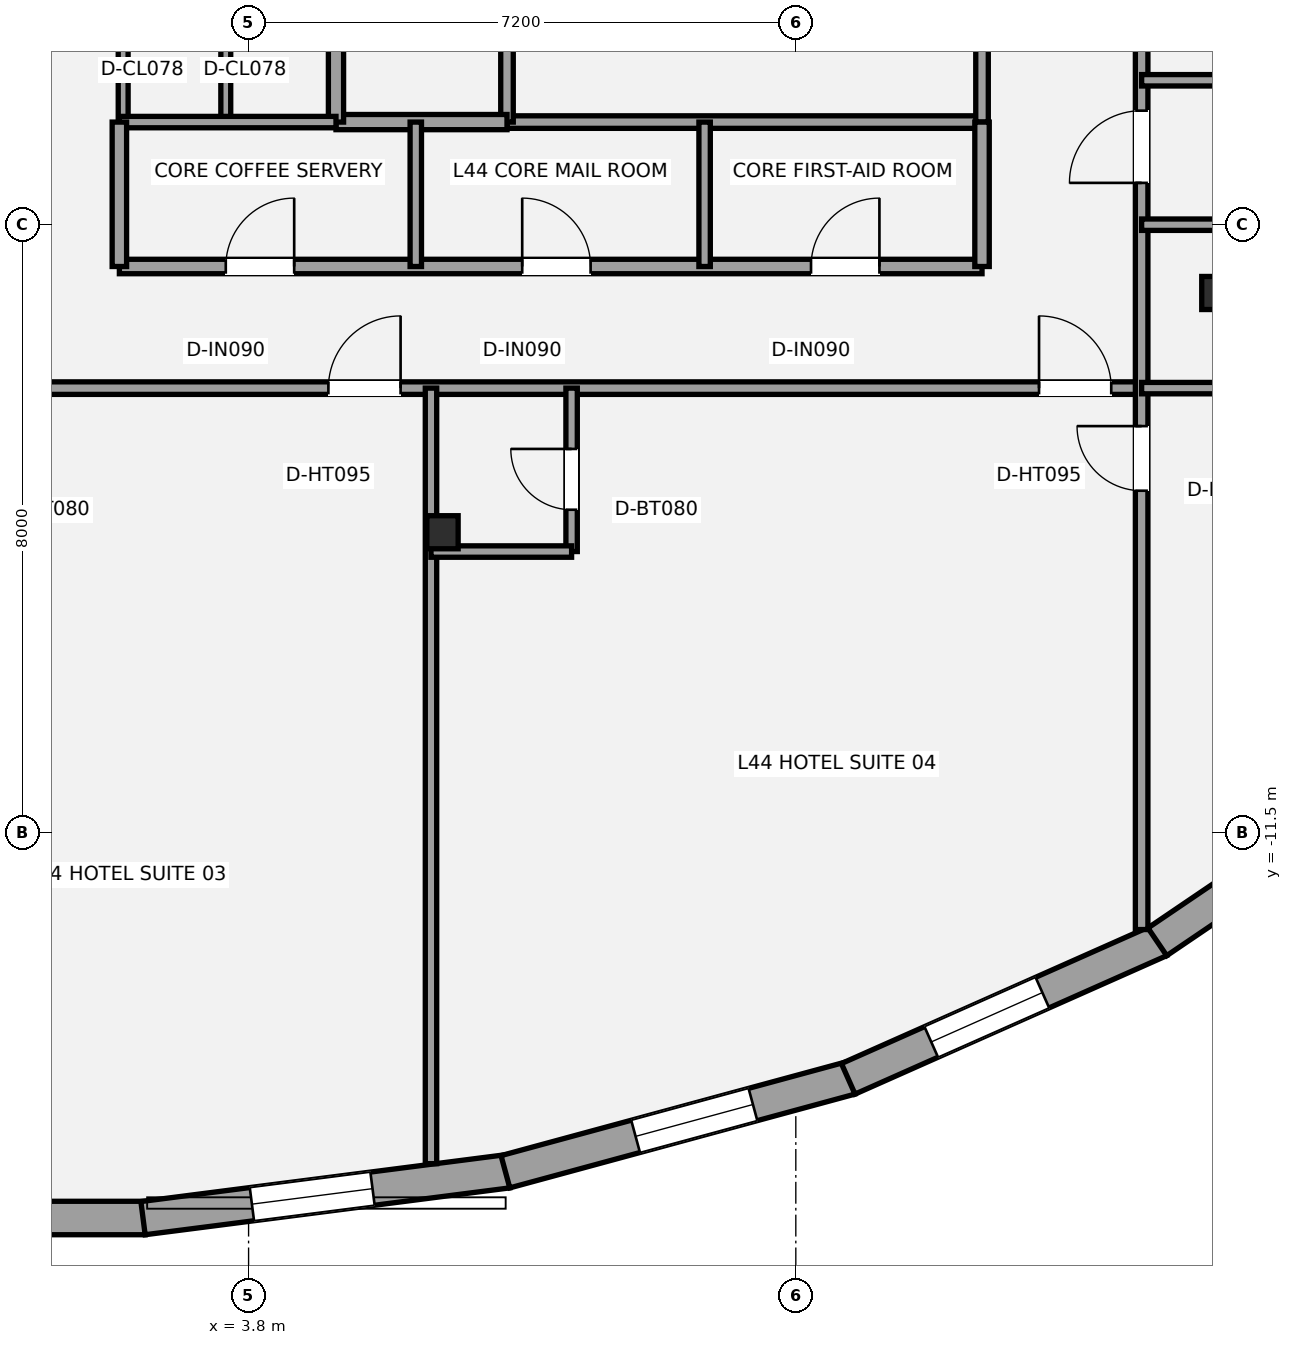
"""IFC4 building model, lengths in metres.
Left out: names, types, materials, properties, quantities, classifications, styles, units other than length and angle.
Written with IfcOpenShell. Run it as: python <this file> out.ifc"""

import sys

from ifc_helpers import new_model, si_unit, direction, frame, frame_2d, origin, origin_2d, place, context, subcontext, project, spatial, rectangle, i_section, extrude, element, fill, save


model = new_model("IFC4")
c1 = context("Model", 3, precision=1e-05, world=origin(), true_north=direction((0.0, 1.0)))
c2 = subcontext(c1, "Body", "Model", "MODEL_VIEW")
j1 = project(units=[si_unit("LENGTHUNIT", "METRE"), si_unit("PLANEANGLEUNIT", "RADIAN")], contexts=[c1])
p1 = place(None, origin())
s1 = spatial("IfcSite", under=j1, at=p1, CompositionType="ELEMENT")
p2 = place(p1, origin())
s2 = spatial("IfcBuilding", under=s1, at=p2, CompositionType="ELEMENT")
p3 = place(p2, frame((0.0, 0.0, 163.0)))
s3 = spatial("IfcBuildingStorey", under=s2, at=p3, CompositionType="ELEMENT", Elevation=163.0)
for number, where, z_axis, x_axis in (
    (1, (6.351, -7.546, 0.0), (0.0, 0.0, 1.0), (1.0, 0.0, 0.0)),
    (2, (16.547, -4.398, 0.0), (0.0, 0.0, 1.0), (1.0, 0.0, 0.0)),
):
    element("IfcColumn", number, at=place(p3, frame(where, z_axis=z_axis, x_axis=x_axis)), inside=s3, PredefinedType="COLUMN", context=c2, shape_type="SweptSolid", body=[
        extrude(i_section(OverallWidth=0.412, OverallDepth=0.435, WebThickness=0.036, FlangeThickness=0.057, at=origin_2d()), origin(), (0.0, 0.0, 1.0), 3.2),
    ])
p4 = place(p3, frame((2.439, -16.568, 0.0), z_axis=(0.0, 0.0, 1.0), x_axis=(-1.0, 0.0, 0.0)))
e3 = element("IfcWall", 3, at=p4, inside=s3, PredefinedType="STANDARD", context=c2, shape_type="SweptSolid", body=[
    extrude(rectangle(XDim=4.878, YDim=0.44, at=frame_2d((2.439, 0.0))), origin(), (0.0, 0.0, 1.0), 2.315),
])
p5 = place(p4, frame((1.441, 0.0, 0.58)))
e4 = element("IfcOpeningElement", 4, at=p5, cuts=e3, PredefinedType="OPENING", context=c2, shape_type="SweptSolid", body=[
    extrude(rectangle(XDim=1.6, YDim=1.55, at=frame_2d((0.8, 0.775))), frame((0.0, 0.23, 0.0), z_axis=(0.0, -1.0, 0.0), x_axis=(1.0, 0.0, 0.0)), (0.0, 0.0, 1.0), 0.46),
])
p6 = place(p3, frame((7.209, -15.954, 0.0), z_axis=(0.0, 0.0, 1.0), x_axis=(-0.991852910824, -0.127388395426, 0.0)))
e5 = element("IfcWall", 5, at=p6, inside=s3, PredefinedType="STANDARD", context=c2, shape_type="SweptSolid", body=[
    extrude(rectangle(XDim=4.837, YDim=0.44, at=frame_2d((2.418, 0.0))), origin(), (0.0, 0.0, 1.0), 2.315),
])
p7 = place(p6, frame((1.793, 0.0, 0.58)))
e6 = element("IfcOpeningElement", 6, at=p7, cuts=e5, PredefinedType="OPENING", context=c2, shape_type="SweptSolid", body=[
    extrude(rectangle(XDim=1.6, YDim=1.55, at=frame_2d((0.8, 0.775))), frame((0.0, 0.23, 0.0), z_axis=(0.0, -1.0, 0.0), x_axis=(1.0, 0.0, 0.0)), (0.0, 0.0, 1.0), 0.46),
])
p8 = place(p3, frame((11.721, -14.726, 0.0), z_axis=(0.0, 0.0, 1.0), x_axis=(-0.965037424263, -0.262112132058, 0.0)))
e7 = element("IfcWall", 7, at=p8, inside=s3, PredefinedType="STANDARD", context=c2, shape_type="SweptSolid", body=[
    extrude(rectangle(XDim=4.707, YDim=0.44, at=frame_2d((2.353, 0.0))), origin(), (0.0, 0.0, 1.0), 2.315),
])
p9 = place(p8, frame((1.332, 0.0, 0.58)))
e8 = element("IfcOpeningElement", 8, at=p9, cuts=e7, PredefinedType="OPENING", context=c2, shape_type="SweptSolid", body=[
    extrude(rectangle(XDim=1.6, YDim=1.55, at=frame_2d((0.8, 0.775))), frame((0.0, 0.23, 0.0), z_axis=(0.0, -1.0, 0.0), x_axis=(1.0, 0.0, 0.0)), (0.0, 0.0, 1.0), 0.46),
])
p10 = place(p3, frame((15.791, -12.916, 0.0), z_axis=(0.0, 0.0, 1.0), x_axis=(-0.913907994914, -0.405921392431, 0.0)))
e9 = element("IfcWall", 9, at=p10, inside=s3, PredefinedType="STANDARD", context=c2, shape_type="SweptSolid", body=[
    extrude(rectangle(XDim=4.487, YDim=0.44, at=frame_2d((2.244, 0.0))), origin(), (0.0, 0.0, 1.0), 2.315),
])
p11 = place(p10, frame((1.692, 0.0, 0.58)))
e10 = element("IfcOpeningElement", 10, at=p11, cuts=e9, PredefinedType="OPENING", context=c2, shape_type="SweptSolid", body=[
    extrude(rectangle(XDim=1.6, YDim=1.55, at=frame_2d((0.8, 0.775))), frame((0.0, 0.23, 0.0), z_axis=(0.0, -1.0, 0.0), x_axis=(1.0, 0.0, 0.0)), (0.0, 0.0, 1.0), 0.46),
])
p12 = place(p3, frame((19.227, -10.583, 0.0), z_axis=(0.0, 0.0, 1.0), x_axis=(-0.827760762475, -0.561081206338, 0.0)))
e11 = element("IfcWall", 11, at=p12, inside=s3, PredefinedType="STANDARD", context=c2, shape_type="SweptSolid", body=[
    extrude(rectangle(XDim=4.192, YDim=0.44, at=frame_2d((2.096, 0.0))), origin(), (0.0, 0.0, 1.0), 2.315),
])
p13 = place(p12, frame((0.947, 0.0, 0.58)))
e12 = element("IfcOpeningElement", 12, at=p13, cuts=e11, PredefinedType="OPENING", context=c2, shape_type="SweptSolid", body=[
    extrude(rectangle(XDim=1.6, YDim=1.55, at=frame_2d((0.8, 0.775))), frame((0.0, 0.23, 0.0), z_axis=(0.0, -1.0, 0.0), x_axis=(1.0, 0.0, 0.0)), (0.0, 0.0, 1.0), 0.46),
])
p14 = place(p3, frame((7.2, -2.15, 0.0), z_axis=(0.0, 0.0, 1.0), x_axis=(1.0, 0.0, 0.0)))
e13 = element("IfcWall", 13, at=p14, inside=s3, PredefinedType="PARTITIONING", context=c2, shape_type="SweptSolid", body=[
    extrude(rectangle(XDim=6.25, YDim=0.165, at=frame_2d((3.125, 0.0))), origin(), (0.0, 0.0, 1.0), 3.02),
])
p15 = place(p3, frame((7.2, -2.15, 0.0), z_axis=(0.0, 0.0, 1.0), x_axis=(0.0, 1.0, 0.0)))
e14 = element("IfcWall", 14, at=p15, inside=s3, PredefinedType="PARTITIONING", context=c2, shape_type="SweptSolid", body=[
    extrude(rectangle(XDim=3.4, YDim=0.165, at=frame_2d((1.7, 0.0))), origin(), (0.0, 0.0, 1.0), 2.473),
])
p16 = place(p3, frame((13.45, -2.15, 0.0), z_axis=(0.0, 0.0, 1.0), x_axis=(0.0, 1.0, 0.0)))
e15 = element("IfcWall", 15, at=p16, inside=s3, PredefinedType="PARTITIONING", context=c2, shape_type="SweptSolid", body=[
    extrude(rectangle(XDim=3.4, YDim=0.165, at=frame_2d((1.7, 0.0))), origin(), (0.0, 0.0, 1.0), 3.02),
])
p17 = place(p16, frame((1.15, 0.0, 0.0)))
e16 = element("IfcOpeningElement", 16, at=p17, cuts=e15, PredefinedType="OPENING", context=c2, shape_type="SweptSolid", body=[
    extrude(rectangle(XDim=1.05, YDim=2.15, at=frame_2d((0.525, 1.075))), frame((0.0, 0.093, 0.0), z_axis=(0.0, -1.0, 0.0), x_axis=(1.0, 0.0, 0.0)), (0.0, 0.0, 1.0), 0.185),
])
p18 = place(p3, frame((4.95, -2.15, 0.0), z_axis=(0.0, 0.0, 1.0), x_axis=(1.0, 0.0, 0.0)))
e17 = element("IfcWall", 17, at=p18, inside=s3, PredefinedType="SOLIDWALL", context=c2, shape_type="SweptSolid", body=[
    extrude(rectangle(XDim=2.25, YDim=0.2, at=frame_2d((1.125, 0.0))), origin(), (0.0, 0.0, 1.0), 3.02),
])
p19 = place(p3, frame((4.95, -2.15, 0.0), z_axis=(0.0, 0.0, 1.0), x_axis=(0.0, 1.0, 0.0)))
e18 = element("IfcWall", 18, at=p19, inside=s3, PredefinedType="SOLIDWALL", context=c2, shape_type="SweptSolid", body=[
    extrude(rectangle(XDim=3.4, YDim=0.2, at=frame_2d((1.7, 0.0))), origin(), (0.0, 0.0, 1.0), 2.473),
])
p20 = place(p19, frame((0.95, 0.0, 0.0)))
e19 = element("IfcOpeningElement", 19, at=p20, cuts=e18, PredefinedType="OPENING", context=c2, shape_type="SweptSolid", body=[
    extrude(rectangle(XDim=0.75, YDim=2.1, at=frame_2d((0.375, 1.05))), frame((0.0, 0.11, 0.0), z_axis=(0.0, -1.0, 0.0), x_axis=(1.0, 0.0, 0.0)), (0.0, 0.0, 1.0), 0.22),
])
p21 = place(p3, frame((2.15, -2.15, 0.0), z_axis=(0.0, 0.0, 1.0), x_axis=(0.0, 1.0, 0.0)))
e20 = element("IfcWall", 20, at=p21, inside=s3, PredefinedType="PARTITIONING", context=c2, shape_type="SweptSolid", body=[
    extrude(rectangle(XDim=1.8, YDim=0.13, at=frame_2d((0.9, 0.0))), origin(), (0.0, 0.0, 1.0), 3.02),
])
p22 = place(p3, frame((3.5, -2.15, 0.0), z_axis=(0.0, 0.0, 1.0), x_axis=(0.0, 1.0, 0.0)))
e21 = element("IfcWall", 21, at=p22, inside=s3, PredefinedType="PARTITIONING", context=c2, shape_type="SweptSolid", body=[
    extrude(rectangle(XDim=1.8, YDim=0.13, at=frame_2d((0.9, 0.0))), origin(), (0.0, 0.0, 1.0), 2.473),
])
p23 = place(p3, frame((2.1, -4.05, 0.0), z_axis=(0.0, 0.0, 1.0), x_axis=(1.0, 0.0, 0.0)))
e22 = element("IfcWall", 22, at=p23, inside=s3, PredefinedType="PLUMBINGWALL", context=c2, shape_type="SweptSolid", body=[
    extrude(rectangle(XDim=11.35, YDim=0.19, at=frame_2d((5.675, 0.0))), origin(), (0.0, 0.0, 1.0), 2.473),
])
p24 = place(p23, frame((1.4, 0.0, 0.0)))
e23 = element("IfcOpeningElement", 23, at=p24, cuts=e22, PredefinedType="OPENING", context=c2, shape_type="SweptSolid", body=[
    extrude(rectangle(XDim=0.9, YDim=2.1, at=frame_2d((0.45, 1.05))), frame((0.0, 0.105, 0.0), z_axis=(0.0, -1.0, 0.0), x_axis=(1.0, 0.0, 0.0)), (0.0, 0.0, 1.0), 0.21),
])
p25 = place(p23, frame((5.3, 0.0, 0.0)))
e24 = element("IfcOpeningElement", 24, at=p25, cuts=e22, PredefinedType="OPENING", context=c2, shape_type="SweptSolid", body=[
    extrude(rectangle(XDim=0.9, YDim=2.1, at=frame_2d((0.45, 1.05))), frame((0.0, 0.105, 0.0), z_axis=(0.0, -1.0, 0.0), x_axis=(1.0, 0.0, 0.0)), (0.0, 0.0, 1.0), 0.21),
])
p26 = place(p23, frame((9.1, 0.0, 0.0)))
e25 = element("IfcOpeningElement", 25, at=p26, cuts=e22, PredefinedType="OPENING", context=c2, shape_type="SweptSolid", body=[
    extrude(rectangle(XDim=0.9, YDim=2.1, at=frame_2d((0.45, 1.05))), frame((0.0, 0.105, 0.0), z_axis=(0.0, -1.0, 0.0), x_axis=(1.0, 0.0, 0.0)), (0.0, 0.0, 1.0), 0.21),
])
p27 = place(p3, frame((2.1, -2.15, 0.0), z_axis=(0.0, 0.0, 1.0), x_axis=(1.0, 0.0, 0.0)))
e26 = element("IfcWall", 26, at=p27, inside=s3, PredefinedType="PLUMBINGWALL", context=c2, shape_type="SweptSolid", body=[
    extrude(rectangle(XDim=2.85, YDim=0.15, at=frame_2d((1.425, 0.0))), origin(), (0.0, 0.0, 1.0), 3.02),
])
for number, where, z_axis, x_axis in (
    (27, (2.1, -4.05, 0.0), (0.0, 0.0, 1.0), (0.0, 1.0, 0.0)),
    (28, (13.45, -4.05, 0.0), (0.0, 0.0, 1.0), (0.0, 1.0, 0.0)),
):
    element("IfcWall", number, at=place(p3, frame(where, z_axis=z_axis, x_axis=x_axis)), inside=s3, PredefinedType="PLUMBINGWALL", context=c2, shape_type="SweptSolid", body=[
        extrude(rectangle(XDim=1.9, YDim=0.19, at=frame_2d((0.95, 0.0))), origin(), (0.0, 0.0, 1.0), 2.473),
    ])
p28 = place(p3, frame((6.0, -4.05, 0.0), z_axis=(0.0, 0.0, 1.0), x_axis=(0.0, 1.0, 0.0)))
e29 = element("IfcWall", 29, at=p28, inside=s3, PredefinedType="PLUMBINGWALL", context=c2, shape_type="SweptSolid", body=[
    extrude(rectangle(XDim=1.9, YDim=0.15, at=frame_2d((0.95, 0.0))), origin(), (0.0, 0.0, 1.0), 2.473),
])
p29 = place(p3, frame((9.8, -4.05, 0.0), z_axis=(0.0, 0.0, 1.0), x_axis=(0.0, 1.0, 0.0)))
e30 = element("IfcWall", 30, at=p29, inside=s3, PredefinedType="PLUMBINGWALL", context=c2, shape_type="SweptSolid", body=[
    extrude(rectangle(XDim=1.9, YDim=0.15, at=frame_2d((0.95, 0.0))), origin(), (0.0, 0.0, 1.0), 3.02),
])
p30 = place(p3, frame((-15.95, -5.65, 0.0), z_axis=(0.0, 0.0, 1.0), x_axis=(1.0, 0.0, 0.0)))
e31 = element("IfcWall", 31, at=p30, inside=s3, PredefinedType="PARTITIONING", context=c2, shape_type="SweptSolid", body=[
    extrude(rectangle(XDim=31.5, YDim=0.165, at=frame_2d((15.75, 0.0))), origin(), (0.0, 0.0, 1.0), 2.398),
])
p31 = place(p30, frame((4.8, 0.0, 0.0)))
e32 = element("IfcOpeningElement", 32, at=p31, cuts=e31, PredefinedType="OPENING", context=c2, shape_type="SweptSolid", body=[
    extrude(rectangle(XDim=0.95, YDim=2.15, at=frame_2d((0.475, 1.075))), frame((0.0, 0.093, 0.0), z_axis=(0.0, -1.0, 0.0), x_axis=(1.0, 0.0, 0.0)), (0.0, 0.0, 1.0), 0.185),
])
p32 = place(p30, frame((12.8, 0.0, 0.0)))
e33 = element("IfcOpeningElement", 33, at=p32, cuts=e31, PredefinedType="OPENING", context=c2, shape_type="SweptSolid", body=[
    extrude(rectangle(XDim=0.95, YDim=2.15, at=frame_2d((0.475, 1.075))), frame((0.0, 0.093, 0.0), z_axis=(0.0, -1.0, 0.0), x_axis=(1.0, 0.0, 0.0)), (0.0, 0.0, 1.0), 0.185),
])
p33 = place(p30, frame((20.8, 0.0, 0.0)))
e34 = element("IfcOpeningElement", 34, at=p33, cuts=e31, PredefinedType="OPENING", context=c2, shape_type="SweptSolid", body=[
    extrude(rectangle(XDim=0.95, YDim=2.15, at=frame_2d((0.475, 1.075))), frame((0.0, 0.093, 0.0), z_axis=(0.0, -1.0, 0.0), x_axis=(1.0, 0.0, 0.0)), (0.0, 0.0, 1.0), 0.185),
])
p34 = place(p30, frame((30.15, 0.0, 0.0)))
e35 = element("IfcOpeningElement", 35, at=p34, cuts=e31, PredefinedType="OPENING", context=c2, shape_type="SweptSolid", body=[
    extrude(rectangle(XDim=0.95, YDim=2.15, at=frame_2d((0.475, 1.075))), frame((0.0, 0.093, 0.0), z_axis=(0.0, -1.0, 0.0), x_axis=(1.0, 0.0, 0.0)), (0.0, 0.0, 1.0), 0.185),
])
p35 = place(p3, frame((15.55, -12.773, 0.0), z_axis=(0.0, 0.0, 1.0), x_axis=(0.0, 1.0, 0.0)))
e36 = element("IfcWall", 36, at=p35, inside=s3, PredefinedType="PARTITIONING", context=c2, shape_type="SweptSolid", body=[
    extrude(rectangle(XDim=20.323, YDim=0.165, at=frame_2d((10.162, 0.0))), origin(), (0.0, 0.0, 1.0), 2.473),
])
p36 = place(p35, frame((5.773, 0.0, 0.0)))
e37 = element("IfcOpeningElement", 37, at=p36, cuts=e36, PredefinedType="OPENING", context=c2, shape_type="SweptSolid", body=[
    extrude(rectangle(XDim=0.85, YDim=2.1, at=frame_2d((0.425, 1.05))), frame((0.0, 0.093, 0.0), z_axis=(0.0, -1.0, 0.0), x_axis=(1.0, 0.0, 0.0)), (0.0, 0.0, 1.0), 0.185),
])
p37 = place(p35, frame((9.823, 0.0, 0.0)))
e38 = element("IfcOpeningElement", 38, at=p37, cuts=e36, PredefinedType="OPENING", context=c2, shape_type="SweptSolid", body=[
    extrude(rectangle(XDim=0.95, YDim=2.15, at=frame_2d((0.475, 1.075))), frame((0.0, 0.093, 0.0), z_axis=(0.0, -1.0, 0.0), x_axis=(1.0, 0.0, 0.0)), (0.0, 0.0, 1.0), 0.185),
])
p38 = place(p35, frame((14.223, 0.0, 0.0)))
e39 = element("IfcOpeningElement", 39, at=p38, cuts=e36, PredefinedType="OPENING", context=c2, shape_type="SweptSolid", body=[
    extrude(rectangle(XDim=0.95, YDim=2.15, at=frame_2d((0.475, 1.075))), frame((0.0, 0.093, 0.0), z_axis=(0.0, -1.0, 0.0), x_axis=(1.0, 0.0, 0.0)), (0.0, 0.0, 1.0), 0.185),
])
p39 = place(p35, frame((18.973, 0.0, 0.0)))
e40 = element("IfcOpeningElement", 40, at=p39, cuts=e36, PredefinedType="OPENING", context=c2, shape_type="SweptSolid", body=[
    extrude(rectangle(XDim=0.95, YDim=2.15, at=frame_2d((0.475, 1.075))), frame((0.0, 0.093, 0.0), z_axis=(0.0, -1.0, 0.0), x_axis=(1.0, 0.0, 0.0)), (0.0, 0.0, 1.0), 0.185),
])
p40 = place(p3, frame((15.55, -5.65, 0.0), z_axis=(0.0, 0.0, 1.0), x_axis=(1.0, 0.0, 0.0)))
e41 = element("IfcWall", 41, at=p40, inside=s3, PredefinedType="PLUMBINGWALL", context=c2, shape_type="SweptSolid", body=[
    extrude(rectangle(XDim=7.346, YDim=0.15, at=frame_2d((3.673, 0.0))), origin(), (0.0, 0.0, 1.0), 2.473),
])
p41 = place(p3, frame((6.2, -15.853, 0.0), z_axis=(0.0, 0.0, 1.0), x_axis=(0.0, 1.0, 0.0)))
e42 = element("IfcWall", 42, at=p41, inside=s3, PredefinedType="PLUMBINGWALL", context=c2, shape_type="SweptSolid", body=[
    extrude(rectangle(XDim=10.203, YDim=0.15, at=frame_2d((5.102, 0.0))), origin(), (0.0, 0.0, 1.0), 2.473),
])
p42 = place(p3, frame((8.05, -7.8, 0.0), z_axis=(0.0, 0.0, 1.0), x_axis=(0.0, 1.0, 0.0)))
e43 = element("IfcWall", 43, at=p42, inside=s3, PredefinedType="PLUMBINGWALL", context=c2, shape_type="SweptSolid", body=[
    extrude(rectangle(XDim=2.15, YDim=0.15, at=frame_2d((1.075, 0.0))), origin(), (0.0, 0.0, 1.0), 2.473),
])
p43 = place(p42, frame((0.55, 0.0, 0.0)))
e44 = element("IfcOpeningElement", 44, at=p43, cuts=e43, PredefinedType="OPENING", context=c2, shape_type="SweptSolid", body=[
    extrude(rectangle(XDim=0.8, YDim=2.1, at=frame_2d((0.4, 1.05))), frame((0.0, 0.085, 0.0), z_axis=(0.0, -1.0, 0.0), x_axis=(1.0, 0.0, 0.0)), (0.0, 0.0, 1.0), 0.17),
])
p44 = place(p3, frame((6.2, -7.8, 0.0), z_axis=(0.0, 0.0, 1.0), x_axis=(1.0, 0.0, 0.0)))
e45 = element("IfcWall", 45, at=p44, inside=s3, PredefinedType="PLUMBINGWALL", context=c2, shape_type="SweptSolid", body=[
    extrude(rectangle(XDim=1.85, YDim=0.15, at=frame_2d((0.925, 0.0))), origin(), (0.0, 0.0, 1.0), 2.473),
])
p45 = place(p3, frame((15.55, -1.6, 0.0), z_axis=(0.0, 0.0, 1.0), x_axis=(1.0, 0.0, 0.0)))
e46 = element("IfcWall", 46, at=p45, inside=s3, PredefinedType="PLUMBINGWALL", context=c2, shape_type="SweptSolid", body=[
    extrude(rectangle(XDim=8.766, YDim=0.15, at=frame_2d((4.383, 0.0))), origin(), (0.0, 0.0, 1.0), 2.398),
])
p46 = place(p3, frame((15.55, -3.5, 0.0), z_axis=(0.0, 0.0, 1.0), x_axis=(1.0, 0.0, 0.0)))
e47 = element("IfcWall", 47, at=p46, inside=s3, PredefinedType="PLUMBINGWALL", context=c2, shape_type="SweptSolid", body=[
    extrude(rectangle(XDim=2.35, YDim=0.15, at=frame_2d((1.175, 0.0))), origin(), (0.0, 0.0, 1.0), 2.398),
])
p47 = place(p7, origin())
e48 = element("IfcWindow", 48, at=p47, inside=s3, PartitioningType="SINGLE_PANEL", PredefinedType="WINDOW", context=c2, shape_type="SweptSolid", body=[
    extrude(rectangle(XDim=1.6, YDim=1.55, at=frame_2d((0.8, 0.775))), frame((0.0, -0.01, 0.0), z_axis=(0.0, -1.0, 0.0), x_axis=(1.0, 0.0, 0.0)), (0.0, 0.0, 1.0), 0.06),
])
fill(e6, e48)
p48 = place(p9, origin())
e49 = element("IfcWindow", 49, at=p48, inside=s3, PartitioningType="SINGLE_PANEL", PredefinedType="WINDOW", context=c2, shape_type="SweptSolid", body=[
    extrude(rectangle(XDim=1.6, YDim=1.55, at=frame_2d((0.8, 0.775))), frame((0.0, -0.01, 0.0), z_axis=(0.0, -1.0, 0.0), x_axis=(1.0, 0.0, 0.0)), (0.0, 0.0, 1.0), 0.06),
])
fill(e8, e49)
p49 = place(p11, origin())
e50 = element("IfcWindow", 50, at=p49, inside=s3, PartitioningType="SINGLE_PANEL", PredefinedType="WINDOW", context=c2, shape_type="SweptSolid", body=[
    extrude(rectangle(XDim=1.6, YDim=1.55, at=frame_2d((0.8, 0.775))), frame((0.0, -0.01, 0.0), z_axis=(0.0, -1.0, 0.0), x_axis=(1.0, 0.0, 0.0)), (0.0, 0.0, 1.0), 0.06),
])
fill(e10, e50)
p50 = place(p24, origin())
e51 = element("IfcDoor", 51, at=p50, inside=s3, OperationType="SINGLE_SWING_RIGHT", PredefinedType="DOOR", context=c2, shape_type="SweptSolid", body=[
    extrude(rectangle(XDim=0.9, YDim=2.1, at=frame_2d((0.45, 1.05))), frame((0.0, 0.025, 0.0), z_axis=(0.0, -1.0, 0.0), x_axis=(1.0, 0.0, 0.0)), (0.0, 0.0, 1.0), 0.05),
])
fill(e23, e51)
p51 = place(p25, origin())
e52 = element("IfcDoor", 52, at=p51, inside=s3, OperationType="SINGLE_SWING_LEFT", PredefinedType="DOOR", context=c2, shape_type="SweptSolid", body=[
    extrude(rectangle(XDim=0.9, YDim=2.1, at=frame_2d((0.45, 1.05))), frame((0.0, 0.025, 0.0), z_axis=(0.0, -1.0, 0.0), x_axis=(1.0, 0.0, 0.0)), (0.0, 0.0, 1.0), 0.05),
])
fill(e24, e52)
p52 = place(p26, origin())
e53 = element("IfcDoor", 53, at=p52, inside=s3, OperationType="SINGLE_SWING_RIGHT", PredefinedType="DOOR", context=c2, shape_type="SweptSolid", body=[
    extrude(rectangle(XDim=0.9, YDim=2.1, at=frame_2d((0.45, 1.05))), frame((0.0, 0.025, 0.0), z_axis=(0.0, -1.0, 0.0), x_axis=(1.0, 0.0, 0.0)), (0.0, 0.0, 1.0), 0.05),
])
fill(e25, e53)
p53 = place(p36, origin())
e54 = element("IfcDoor", 54, at=p53, inside=s3, OperationType="SINGLE_SWING_RIGHT", PredefinedType="DOOR", context=c2, shape_type="SweptSolid", body=[
    extrude(rectangle(XDim=0.85, YDim=2.1, at=frame_2d((0.425, 1.05))), frame((0.0, 0.025, 0.0), z_axis=(0.0, -1.0, 0.0), x_axis=(1.0, 0.0, 0.0)), (0.0, 0.0, 1.0), 0.05),
])
fill(e37, e54)
p54 = place(p33, origin())
e55 = element("IfcDoor", 55, at=p54, inside=s3, OperationType="SINGLE_SWING_RIGHT", PredefinedType="DOOR", context=c2, shape_type="SweptSolid", body=[
    extrude(rectangle(XDim=0.95, YDim=2.15, at=frame_2d((0.475, 1.075))), frame((0.0, 0.025, 0.0), z_axis=(0.0, -1.0, 0.0), x_axis=(1.0, 0.0, 0.0)), (0.0, 0.0, 1.0), 0.05),
])
fill(e34, e55)
p55 = place(p34, origin())
e56 = element("IfcDoor", 56, at=p55, inside=s3, OperationType="SINGLE_SWING_LEFT", PredefinedType="DOOR", context=c2, shape_type="SweptSolid", body=[
    extrude(rectangle(XDim=0.95, YDim=2.15, at=frame_2d((0.475, 1.075))), frame((0.0, 0.025, 0.0), z_axis=(0.0, -1.0, 0.0), x_axis=(1.0, 0.0, 0.0)), (0.0, 0.0, 1.0), 0.05),
])
fill(e35, e56)
p56 = place(p43, origin())
e57 = element("IfcDoor", 57, at=p56, inside=s3, OperationType="SINGLE_SWING_RIGHT", PredefinedType="DOOR", context=c2, shape_type="SweptSolid", body=[
    extrude(rectangle(XDim=0.8, YDim=2.1, at=frame_2d((0.4, 1.05))), frame((0.0, 0.025, 0.0), z_axis=(0.0, -1.0, 0.0), x_axis=(1.0, 0.0, 0.0)), (0.0, 0.0, 1.0), 0.05),
])
fill(e44, e57)
p57 = place(p37, origin())
e58 = element("IfcDoor", 58, at=p57, inside=s3, OperationType="SINGLE_SWING_LEFT", PredefinedType="DOOR", context=c2, shape_type="SweptSolid", body=[
    extrude(rectangle(XDim=0.95, YDim=2.15, at=frame_2d((0.475, 1.075))), frame((0.0, 0.025, 0.0), z_axis=(0.0, -1.0, 0.0), x_axis=(1.0, 0.0, 0.0)), (0.0, 0.0, 1.0), 0.05),
])
fill(e38, e58)
save(model, sys.argv[1])
